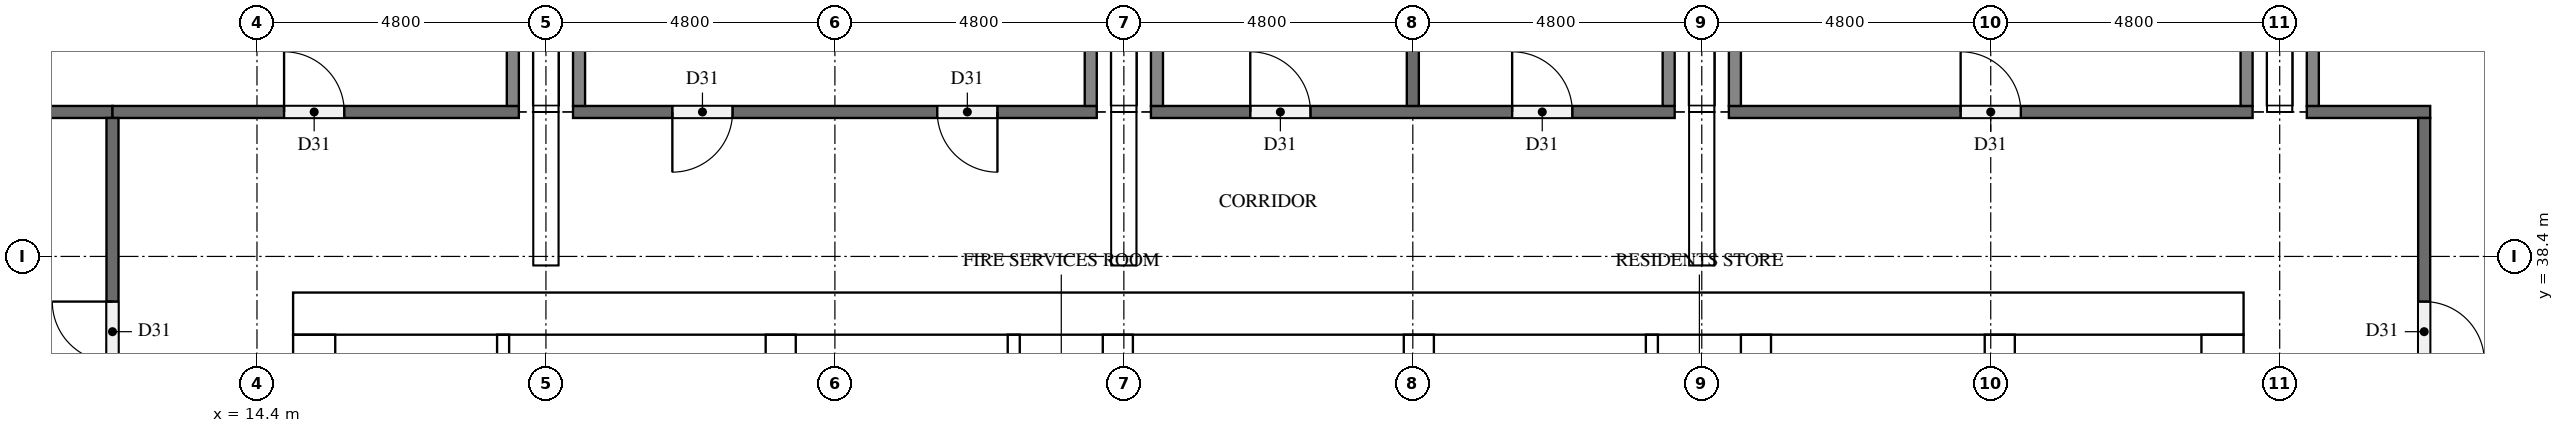
"""IFC4 building model, lengths in metres.
Left out: names, types, materials, properties, quantities, classifications, styles, units other than length and angle.
Written with IfcOpenShell. Run it as: python <this file> out.ifc"""

import sys

from ifc_helpers import new_model, si_unit, direction, frame, frame_2d, origin, place, context, subcontext, project, spatial, rectangle, extrude, element, fill, save


model = new_model("IFC4")
c1 = context("Model", 3, precision=1e-05, world=origin(), true_north=direction((0.0, 1.0)))
c2 = subcontext(c1, "Body", "Model", "MODEL_VIEW")
j1 = project(units=[si_unit("LENGTHUNIT", "METRE"), si_unit("PLANEANGLEUNIT", "RADIAN")], contexts=[c1])
p1 = place(None, origin())
s1 = spatial("IfcSite", under=j1, at=p1, CompositionType="ELEMENT")
p2 = place(p1, origin())
s2 = spatial("IfcBuilding", under=s1, at=p2, CompositionType="ELEMENT")
p3 = place(p2, frame((0.0, 0.0, 203.4)))
s3 = spatial("IfcBuildingStorey", under=s2, at=p3, CompositionType="ELEMENT", Elevation=203.4)
p4 = place(p3, frame((15.0, 37.45, 0.0), z_axis=(0.0, 0.0, 1.0), x_axis=(1.0, 0.0, 0.0)))
e1 = element("IfcWall", 1, at=p4, inside=s3, PredefinedType="SHEAR", context=c2, shape_type="SweptSolid", body=[
    extrude(rectangle(XDim=32.4, YDim=0.7, at=frame_2d((16.2, 0.0))), origin(), (0.0, 0.0, 1.0), 5.1),
])
p5 = place(p4, frame((15.3, 0.0, 0.0)))
e2 = element("IfcOpeningElement", 2, at=p5, cuts=e1, PredefinedType="OPENING", context=c2, shape_type="SweptSolid", body=[
    extrude(rectangle(XDim=1.8, YDim=2.1, at=frame_2d((0.9, 1.05))), frame((0.0, 0.36, 0.0), z_axis=(0.0, -1.0, 0.0), x_axis=(1.0, 0.0, 0.0)), (0.0, 0.0, 1.0), 0.72),
])
p6 = place(p4, frame((1.544, 0.0, 0.0)))
e3 = element("IfcOpeningElement", 3, at=p6, cuts=e1, PredefinedType="OPENING", context=c2, shape_type="SweptSolid", body=[
    extrude(rectangle(XDim=1.0, YDim=2.1, at=frame_2d((0.5, 1.05))), frame((0.0, 0.36, 0.0), z_axis=(0.0, -1.0, 0.0), x_axis=(1.0, 0.0, 0.0)), (0.0, 0.0, 1.0), 0.72),
])
p7 = place(p4, frame((5.219, 0.0, 0.0)))
e4 = element("IfcOpeningElement", 4, at=p7, cuts=e1, PredefinedType="OPENING", context=c2, shape_type="SweptSolid", body=[
    extrude(rectangle(XDim=1.0, YDim=2.1, at=frame_2d((0.5, 1.05))), frame((0.0, 0.36, 0.0), z_axis=(0.0, -1.0, 0.0), x_axis=(1.0, 0.0, 0.0)), (0.0, 0.0, 1.0), 0.72),
])
p8 = place(p3, frame((15.35, 15.7, 0.0), z_axis=(0.0, 0.0, 1.0), x_axis=(0.0, 1.0, 0.0)))
e5 = element("IfcWall", 5, at=p8, inside=s3, PredefinedType="SHEAR", context=c2, shape_type="SweptSolid", body=[
    extrude(rectangle(XDim=21.4, YDim=0.7, at=frame_2d((10.7, 0.0))), origin(), (0.0, 0.0, 1.0), 5.1),
])
p9 = place(p8, frame((5.06, 0.0, 0.0)))
e6 = element("IfcOpeningElement", 6, at=p9, cuts=e5, PredefinedType="OPENING", context=c2, shape_type="SweptSolid", body=[
    extrude(rectangle(XDim=1.2, YDim=2.1, at=frame_2d((0.6, 1.05))), frame((0.0, 0.36, 0.0), z_axis=(0.0, -1.0, 0.0), x_axis=(1.0, 0.0, 0.0)), (0.0, 0.0, 1.0), 0.72),
])
p10 = place(p3, frame((47.05, 15.7, 0.0), z_axis=(0.0, 0.0, 1.0), x_axis=(0.0, 1.0, 0.0)))
e7 = element("IfcWall", 7, at=p10, inside=s3, PredefinedType="SHEAR", context=c2, shape_type="SweptSolid", body=[
    extrude(rectangle(XDim=21.4, YDim=0.7, at=frame_2d((10.7, 0.0))), origin(), (0.0, 0.0, 1.0), 5.1),
])
p11 = place(p10, frame((10.4, 0.0, 0.0)))
e8 = element("IfcOpeningElement", 8, at=p11, cuts=e7, PredefinedType="OPENING", context=c2, shape_type="SweptSolid", body=[
    extrude(rectangle(XDim=1.2, YDim=2.1, at=frame_2d((0.6, 1.05))), frame((0.0, 0.36, 0.0), z_axis=(0.0, -1.0, 0.0), x_axis=(1.0, 0.0, 0.0)), (0.0, 0.0, 1.0), 0.72),
])
p12 = place(p3, frame((23.1, 15.7, 0.0), z_axis=(0.0, 0.0, 1.0), x_axis=(0.0, 1.0, 0.0)))
e9 = element("IfcWall", 9, at=p12, inside=s3, PredefinedType="SHEAR", context=c2, shape_type="SweptSolid", body=[
    extrude(rectangle(XDim=21.4, YDim=0.5, at=frame_2d((10.7, 0.0))), origin(), (0.0, 0.0, 1.0), 5.1),
])
p13 = place(p3, frame((39.3, 27.75, 0.0), z_axis=(0.0, 0.0, 1.0), x_axis=(0.0, 1.0, 0.0)))
e10 = element("IfcWall", 10, at=p13, inside=s3, PredefinedType="SHEAR", context=c2, shape_type="SweptSolid", body=[
    extrude(rectangle(XDim=9.35, YDim=0.5, at=frame_2d((4.675, 0.0))), origin(), (0.0, 0.0, 1.0), 5.1),
])
p14 = place(p3, frame((43.35, 27.75, 0.0), z_axis=(0.0, 0.0, 1.0), x_axis=(0.0, 1.0, 0.0)))
e11 = element("IfcWall", 11, at=p14, inside=s3, PredefinedType="SHEAR", context=c2, shape_type="SweptSolid", body=[
    extrude(rectangle(XDim=9.35, YDim=0.5, at=frame_2d((4.675, 0.0))), origin(), (0.0, 0.0, 1.0), 5.1),
])
p15 = place(p14, frame((7.65, 0.0, 0.0)))
e12 = element("IfcOpeningElement", 12, at=p15, cuts=e11, PredefinedType="OPENING", context=c2, shape_type="SweptSolid", body=[
    extrude(rectangle(XDim=1.2, YDim=2.1, at=frame_2d((0.6, 1.05))), frame((0.0, 0.26, 0.0), z_axis=(0.0, -1.0, 0.0), x_axis=(1.0, 0.0, 0.0)), (0.0, 0.0, 1.0), 0.52),
])
for number, where, z_axis, x_axis in (
    (13, (28.7, 33.8, 0.0), (0.0, 0.0, 1.0), (0.0, 1.0, 0.0)),
    (14, (33.7, 33.8, 0.0), (0.0, 0.0, 1.0), (0.0, 1.0, 0.0)),
):
    element("IfcWall", number, at=place(p3, frame(where, z_axis=z_axis, x_axis=x_axis)), inside=s3, PredefinedType="SHEAR", context=c2, shape_type="SweptSolid", body=[
        extrude(rectangle(XDim=3.3, YDim=0.5, at=frame_2d((1.65, 0.0))), origin(), (0.0, 0.0, 1.0), 5.1),
    ])
p16 = place(p3, frame((18.489, 31.5, 0.0), z_axis=(0.0, 0.0, 1.0), x_axis=(0.0, 1.0, 0.0)))
e15 = element("IfcWall", 15, at=p16, inside=s3, PredefinedType="PARTITIONING", context=c2, shape_type="SweptSolid", body=[
    extrude(rectangle(XDim=5.6, YDim=0.2, at=frame_2d((2.8, 0.0))), origin(), (0.0, 0.0, 1.0), 5.1),
])
for number, where, z_axis, x_axis in (
    (16, (26.971, 33.8, 0.0), (0.0, 0.0, 1.0), (0.0, 1.0, 0.0)),
    (17, (37.571, 33.8, 0.0), (0.0, 0.0, 1.0), (0.0, 1.0, 0.0)),
):
    element("IfcWall", number, at=place(p3, frame(where, z_axis=z_axis, x_axis=x_axis)), inside=s3, PredefinedType="PARTITIONING", context=c2, shape_type="SweptSolid", body=[
        extrude(rectangle(XDim=3.3, YDim=0.2, at=frame_2d((1.65, 0.0))), origin(), (0.0, 0.0, 1.0), 5.1),
    ])
p17 = place(p3, frame((10.25, 40.8, 0.0), z_axis=(0.0, 0.0, 1.0), x_axis=(1.0, 0.0, 0.0)))
e18 = element("IfcWall", 18, at=p17, inside=s3, PredefinedType="PARTITIONING", context=c2, shape_type="SweptSolid", body=[
    extrude(rectangle(XDim=1.75, YDim=0.2, at=frame_2d((0.875, 0.0))), origin(), (0.0, 0.0, 1.0), 5.1),
])
p18 = place(p3, frame((12.0, 40.8, 0.0), z_axis=(0.0, 0.0, 1.0), x_axis=(1.0, 0.0, 0.0)))
e19 = element("IfcWall", 19, at=p18, inside=s3, PredefinedType="PARTITIONING", context=c2, shape_type="SweptSolid", body=[
    extrude(rectangle(XDim=6.75, YDim=0.2, at=frame_2d((3.375, 0.0))), origin(), (0.0, 0.0, 1.0), 5.1),
])
p19 = place(p18, frame((2.85, 0.0, 0.0)))
e20 = element("IfcOpeningElement", 20, at=p19, cuts=e19, PredefinedType="OPENING", context=c2, shape_type="SweptSolid", body=[
    extrude(rectangle(XDim=1.0, YDim=2.1, at=frame_2d((0.5, 1.05))), frame((0.0, 0.11, 0.0), z_axis=(0.0, -1.0, 0.0), x_axis=(1.0, 0.0, 0.0)), (0.0, 0.0, 1.0), 0.22),
])
p20 = place(p3, frame((28.35, 40.8, 0.0), z_axis=(0.0, 0.0, 1.0), x_axis=(-1.0, 0.0, 0.0)))
e21 = element("IfcWall", 21, at=p20, inside=s3, PredefinedType="PARTITIONING", context=c2, shape_type="SweptSolid", body=[
    extrude(rectangle(XDim=8.7, YDim=0.2, at=frame_2d((4.35, 0.0))), origin(), (0.0, 0.0, 1.0), 5.1),
])
p21 = place(p20, frame((6.05, 0.0, 0.0)))
e22 = element("IfcOpeningElement", 22, at=p21, cuts=e21, PredefinedType="OPENING", context=c2, shape_type="SweptSolid", body=[
    extrude(rectangle(XDim=1.0, YDim=2.1, at=frame_2d((0.5, 1.05))), frame((0.0, 0.11, 0.0), z_axis=(0.0, -1.0, 0.0), x_axis=(1.0, 0.0, 0.0)), (0.0, 0.0, 1.0), 0.22),
])
p22 = place(p20, frame((1.65, 0.0, 0.0)))
e23 = element("IfcOpeningElement", 23, at=p22, cuts=e21, PredefinedType="OPENING", context=c2, shape_type="SweptSolid", body=[
    extrude(rectangle(XDim=1.0, YDim=2.1, at=frame_2d((0.5, 1.05))), frame((0.0, 0.11, 0.0), z_axis=(0.0, -1.0, 0.0), x_axis=(1.0, 0.0, 0.0)), (0.0, 0.0, 1.0), 0.22),
])
p23 = place(p3, frame((29.25, 40.8, 0.0), z_axis=(0.0, 0.0, 1.0), x_axis=(1.0, 0.0, 0.0)))
e24 = element("IfcWall", 24, at=p23, inside=s3, PredefinedType="PARTITIONING", context=c2, shape_type="SweptSolid", body=[
    extrude(rectangle(XDim=8.7, YDim=0.2, at=frame_2d((4.35, 0.0))), origin(), (0.0, 0.0, 1.0), 5.1),
])
p24 = place(p23, frame((1.65, 0.0, 0.0)))
e25 = element("IfcOpeningElement", 25, at=p24, cuts=e24, PredefinedType="OPENING", context=c2, shape_type="SweptSolid", body=[
    extrude(rectangle(XDim=1.0, YDim=2.1, at=frame_2d((0.5, 1.05))), frame((0.0, 0.11, 0.0), z_axis=(0.0, -1.0, 0.0), x_axis=(1.0, 0.0, 0.0)), (0.0, 0.0, 1.0), 0.22),
])
p25 = place(p23, frame((6.0, 0.0, 0.0)))
e26 = element("IfcOpeningElement", 26, at=p25, cuts=e24, PredefinedType="OPENING", context=c2, shape_type="SweptSolid", body=[
    extrude(rectangle(XDim=1.0, YDim=2.1, at=frame_2d((0.5, 1.05))), frame((0.0, 0.11, 0.0), z_axis=(0.0, -1.0, 0.0), x_axis=(1.0, 0.0, 0.0)), (0.0, 0.0, 1.0), 0.22),
])
p26 = place(p3, frame((38.85, 40.8, 0.0), z_axis=(0.0, 0.0, 1.0), x_axis=(1.0, 0.0, 0.0)))
e27 = element("IfcWall", 27, at=p26, inside=s3, PredefinedType="PARTITIONING", context=c2, shape_type="SweptSolid", body=[
    extrude(rectangle(XDim=8.7, YDim=0.2, at=frame_2d((4.35, 0.0))), origin(), (0.0, 0.0, 1.0), 5.1),
])
p27 = place(p26, frame((3.85, 0.0, 0.0)))
e28 = element("IfcOpeningElement", 28, at=p27, cuts=e27, PredefinedType="OPENING", context=c2, shape_type="SweptSolid", body=[
    extrude(rectangle(XDim=1.0, YDim=2.1, at=frame_2d((0.5, 1.05))), frame((0.0, 0.11, 0.0), z_axis=(0.0, -1.0, 0.0), x_axis=(1.0, 0.0, 0.0)), (0.0, 0.0, 1.0), 0.22),
])
p28 = place(p3, frame((48.45, 40.8, 0.0), z_axis=(0.0, 0.0, 1.0), x_axis=(1.0, 0.0, 0.0)))
e29 = element("IfcWall", 29, at=p28, inside=s3, PredefinedType="PARTITIONING", context=c2, shape_type="SweptSolid", body=[
    extrude(rectangle(XDim=2.05, YDim=0.2, at=frame_2d((1.025, 0.0))), origin(), (0.0, 0.0, 1.0), 5.1),
])
p29 = place(p3, frame((12.0, 12.1, 0.0), z_axis=(0.0, 0.0, 1.0), x_axis=(0.0, 1.0, 0.0)))
e30 = element("IfcWall", 30, at=p29, inside=s3, PredefinedType="PARTITIONING", context=c2, shape_type="SweptSolid", body=[
    extrude(rectangle(XDim=28.6, YDim=0.2, at=frame_2d((14.3, 0.0))), origin(), (0.0, 0.0, 1.0), 5.1),
])
p30 = place(p29, frame((3.05, 0.0, 0.0)))
e31 = element("IfcOpeningElement", 31, at=p30, cuts=e30, PredefinedType="OPENING", context=c2, shape_type="SweptSolid", body=[
    extrude(rectangle(XDim=1.0, YDim=2.1, at=frame_2d((0.5, 1.05))), frame((0.0, 0.11, 0.0), z_axis=(0.0, -1.0, 0.0), x_axis=(1.0, 0.0, 0.0)), (0.0, 0.0, 1.0), 0.22),
])
p31 = place(p29, frame((9.05, 0.0, 0.0)))
e32 = element("IfcOpeningElement", 32, at=p31, cuts=e30, PredefinedType="OPENING", context=c2, shape_type="SweptSolid", body=[
    extrude(rectangle(XDim=1.0, YDim=2.1, at=frame_2d((0.5, 1.05))), frame((0.0, 0.11, 0.0), z_axis=(0.0, -1.0, 0.0), x_axis=(1.0, 0.0, 0.0)), (0.0, 0.0, 1.0), 0.22),
])
p32 = place(p29, frame((16.25, 0.0, 0.0)))
e33 = element("IfcOpeningElement", 33, at=p32, cuts=e30, PredefinedType="OPENING", context=c2, shape_type="SweptSolid", body=[
    extrude(rectangle(XDim=1.0, YDim=2.1, at=frame_2d((0.5, 1.05))), frame((0.0, 0.11, 0.0), z_axis=(0.0, -1.0, 0.0), x_axis=(1.0, 0.0, 0.0)), (0.0, 0.0, 1.0), 0.22),
])
p33 = place(p29, frame((24.55, 0.0, 0.0)))
e34 = element("IfcOpeningElement", 34, at=p33, cuts=e30, PredefinedType="OPENING", context=c2, shape_type="SweptSolid", body=[
    extrude(rectangle(XDim=1.0, YDim=2.1, at=frame_2d((0.5, 1.05))), frame((0.0, 0.11, 0.0), z_axis=(0.0, -1.0, 0.0), x_axis=(1.0, 0.0, 0.0)), (0.0, 0.0, 1.0), 0.22),
])
for number, where, z_axis, x_axis in (
    (35, (18.65, 40.9, 0.0), (0.0, 0.0, 1.0), (0.0, 1.0, 0.0)),
    (36, (19.75, 40.9, 0.0), (0.0, 0.0, 1.0), (0.0, 1.0, 0.0)),
    (37, (28.25, 40.9, 0.0), (0.0, 0.0, 1.0), (0.0, 1.0, 0.0)),
    (38, (29.35, 40.9, 0.0), (0.0, 0.0, 1.0), (0.0, 1.0, 0.0)),
    (39, (33.6, 40.9, 0.0), (0.0, 0.0, 1.0), (0.0, 1.0, 0.0)),
    (40, (37.85, 40.9, 0.0), (0.0, 0.0, 1.0), (0.0, 1.0, 0.0)),
    (41, (38.95, 40.9, 0.0), (0.0, 0.0, 1.0), (0.0, 1.0, 0.0)),
    (42, (47.45, 40.9, 0.0), (0.0, 0.0, 1.0), (0.0, 1.0, 0.0)),
    (43, (48.55, 40.9, 0.0), (0.0, 0.0, 1.0), (0.0, 1.0, 0.0)),
):
    element("IfcWall", number, at=place(p3, frame(where, z_axis=z_axis, x_axis=x_axis)), inside=s3, PredefinedType="PARTITIONING", context=c2, shape_type="SweptSolid", body=[
        extrude(rectangle(XDim=9.6, YDim=0.2, at=frame_2d((4.8, 0.0))), origin(), (0.0, 0.0, 1.0), 5.1),
    ])
p34 = place(p3, frame((50.4, 40.7, 0.0), z_axis=(0.0, 0.0, 1.0), x_axis=(0.0, -1.0, 0.0)))
e44 = element("IfcWall", 44, at=p34, inside=s3, PredefinedType="PARTITIONING", context=c2, shape_type="SweptSolid", body=[
    extrude(rectangle(XDim=28.6, YDim=0.2, at=frame_2d((14.3, 0.0))), origin(), (0.0, 0.0, 1.0), 5.1),
])
p35 = place(p34, frame((24.55, 0.0, 0.0)))
e45 = element("IfcOpeningElement", 45, at=p35, cuts=e44, PredefinedType="OPENING", context=c2, shape_type="SweptSolid", body=[
    extrude(rectangle(XDim=1.0, YDim=2.1, at=frame_2d((0.5, 1.05))), frame((0.0, 0.11, 0.0), z_axis=(0.0, -1.0, 0.0), x_axis=(1.0, 0.0, 0.0)), (0.0, 0.0, 1.0), 0.22),
])
p36 = place(p34, frame((18.65, 0.0, 0.0)))
e46 = element("IfcOpeningElement", 46, at=p36, cuts=e44, PredefinedType="OPENING", context=c2, shape_type="SweptSolid", body=[
    extrude(rectangle(XDim=1.0, YDim=2.1, at=frame_2d((0.5, 1.05))), frame((0.0, 0.11, 0.0), z_axis=(0.0, -1.0, 0.0), x_axis=(1.0, 0.0, 0.0)), (0.0, 0.0, 1.0), 0.22),
])
p37 = place(p34, frame((11.45, 0.0, 0.0)))
e47 = element("IfcOpeningElement", 47, at=p37, cuts=e44, PredefinedType="OPENING", context=c2, shape_type="SweptSolid", body=[
    extrude(rectangle(XDim=1.0, YDim=2.1, at=frame_2d((0.5, 1.05))), frame((0.0, 0.11, 0.0), z_axis=(0.0, -1.0, 0.0), x_axis=(1.0, 0.0, 0.0)), (0.0, 0.0, 1.0), 0.22),
])
p38 = place(p34, frame((3.05, 0.0, 0.0)))
e48 = element("IfcOpeningElement", 48, at=p38, cuts=e44, PredefinedType="OPENING", context=c2, shape_type="SweptSolid", body=[
    extrude(rectangle(XDim=1.0, YDim=2.1, at=frame_2d((0.5, 1.05))), frame((0.0, 0.11, 0.0), z_axis=(0.0, -1.0, 0.0), x_axis=(1.0, 0.0, 0.0)), (0.0, 0.0, 1.0), 0.22),
])
p39 = place(p5, origin())
e49 = element("IfcDoor", 49, at=p39, inside=s3, OperationType="DOUBLE_DOOR_SINGLE_SWING", PredefinedType="DOOR", context=c2, shape_type="SweptSolid", body=[
    extrude(rectangle(XDim=1.8, YDim=2.1, at=frame_2d((0.9, 1.05))), frame((0.0, 0.025, 0.0), z_axis=(0.0, -1.0, 0.0), x_axis=(1.0, 0.0, 0.0)), (0.0, 0.0, 1.0), 0.05),
])
fill(e2, e49)
p40 = place(p6, origin())
e50 = element("IfcDoor", 50, at=p40, inside=s3, OperationType="SINGLE_SWING_RIGHT", PredefinedType="DOOR", context=c2, shape_type="SweptSolid", body=[
    extrude(rectangle(XDim=1.0, YDim=2.1, at=frame_2d((0.5, 1.05))), frame((0.0, 0.025, 0.0), z_axis=(0.0, -1.0, 0.0), x_axis=(1.0, 0.0, 0.0)), (0.0, 0.0, 1.0), 0.05),
])
fill(e3, e50)
p41 = place(p7, origin())
e51 = element("IfcDoor", 51, at=p41, inside=s3, OperationType="SINGLE_SWING_LEFT", PredefinedType="DOOR", context=c2, shape_type="SweptSolid", body=[
    extrude(rectangle(XDim=1.0, YDim=2.1, at=frame_2d((0.5, 1.05))), frame((0.0, 0.025, 0.0), z_axis=(0.0, -1.0, 0.0), x_axis=(1.0, 0.0, 0.0)), (0.0, 0.0, 1.0), 0.05),
])
fill(e4, e51)
p42 = place(p19, origin())
e52 = element("IfcDoor", 52, at=p42, inside=s3, OperationType="SINGLE_SWING_LEFT", PredefinedType="DOOR", context=c2, shape_type="SweptSolid", body=[
    extrude(rectangle(XDim=1.0, YDim=2.1, at=frame_2d((0.5, 1.05))), frame((0.0, 0.025, 0.0), z_axis=(0.0, -1.0, 0.0), x_axis=(1.0, 0.0, 0.0)), (0.0, 0.0, 1.0), 0.05),
])
fill(e20, e52)
p43 = place(p21, origin())
e53 = element("IfcDoor", 53, at=p43, inside=s3, OperationType="SINGLE_SWING_RIGHT", PredefinedType="DOOR", context=c2, shape_type="SweptSolid", body=[
    extrude(rectangle(XDim=1.0, YDim=2.1, at=frame_2d((0.5, 1.05))), frame((0.0, 0.025, 0.0), z_axis=(0.0, -1.0, 0.0), x_axis=(1.0, 0.0, 0.0)), (0.0, 0.0, 1.0), 0.05),
])
fill(e22, e53)
p44 = place(p22, origin())
e54 = element("IfcDoor", 54, at=p44, inside=s3, OperationType="SINGLE_SWING_LEFT", PredefinedType="DOOR", context=c2, shape_type="SweptSolid", body=[
    extrude(rectangle(XDim=1.0, YDim=2.1, at=frame_2d((0.5, 1.05))), frame((0.0, 0.025, 0.0), z_axis=(0.0, -1.0, 0.0), x_axis=(1.0, 0.0, 0.0)), (0.0, 0.0, 1.0), 0.05),
])
fill(e23, e54)
p45 = place(p24, origin())
e55 = element("IfcDoor", 55, at=p45, inside=s3, OperationType="SINGLE_SWING_LEFT", PredefinedType="DOOR", context=c2, shape_type="SweptSolid", body=[
    extrude(rectangle(XDim=1.0, YDim=2.1, at=frame_2d((0.5, 1.05))), frame((0.0, 0.025, 0.0), z_axis=(0.0, -1.0, 0.0), x_axis=(1.0, 0.0, 0.0)), (0.0, 0.0, 1.0), 0.05),
])
fill(e25, e55)
p46 = place(p25, origin())
e56 = element("IfcDoor", 56, at=p46, inside=s3, OperationType="SINGLE_SWING_LEFT", PredefinedType="DOOR", context=c2, shape_type="SweptSolid", body=[
    extrude(rectangle(XDim=1.0, YDim=2.1, at=frame_2d((0.5, 1.05))), frame((0.0, 0.025, 0.0), z_axis=(0.0, -1.0, 0.0), x_axis=(1.0, 0.0, 0.0)), (0.0, 0.0, 1.0), 0.05),
])
fill(e26, e56)
p47 = place(p27, origin())
e57 = element("IfcDoor", 57, at=p47, inside=s3, OperationType="SINGLE_SWING_LEFT", PredefinedType="DOOR", context=c2, shape_type="SweptSolid", body=[
    extrude(rectangle(XDim=1.0, YDim=2.1, at=frame_2d((0.5, 1.05))), frame((0.0, 0.025, 0.0), z_axis=(0.0, -1.0, 0.0), x_axis=(1.0, 0.0, 0.0)), (0.0, 0.0, 1.0), 0.05),
])
fill(e28, e57)
p48 = place(p38, origin())
e58 = element("IfcDoor", 58, at=p48, inside=s3, OperationType="SINGLE_SWING_RIGHT", PredefinedType="DOOR", context=c2, shape_type="SweptSolid", body=[
    extrude(rectangle(XDim=1.0, YDim=2.1, at=frame_2d((0.5, 1.05))), frame((0.0, 0.025, 0.0), z_axis=(0.0, -1.0, 0.0), x_axis=(1.0, 0.0, 0.0)), (0.0, 0.0, 1.0), 0.05),
])
fill(e48, e58)
p49 = place(p33, origin())
e59 = element("IfcDoor", 59, at=p49, inside=s3, OperationType="SINGLE_SWING_RIGHT", PredefinedType="DOOR", context=c2, shape_type="SweptSolid", body=[
    extrude(rectangle(XDim=1.0, YDim=2.1, at=frame_2d((0.5, 1.05))), frame((0.0, 0.025, 0.0), z_axis=(0.0, -1.0, 0.0), x_axis=(1.0, 0.0, 0.0)), (0.0, 0.0, 1.0), 0.05),
])
fill(e34, e59)
save(model, sys.argv[1])
